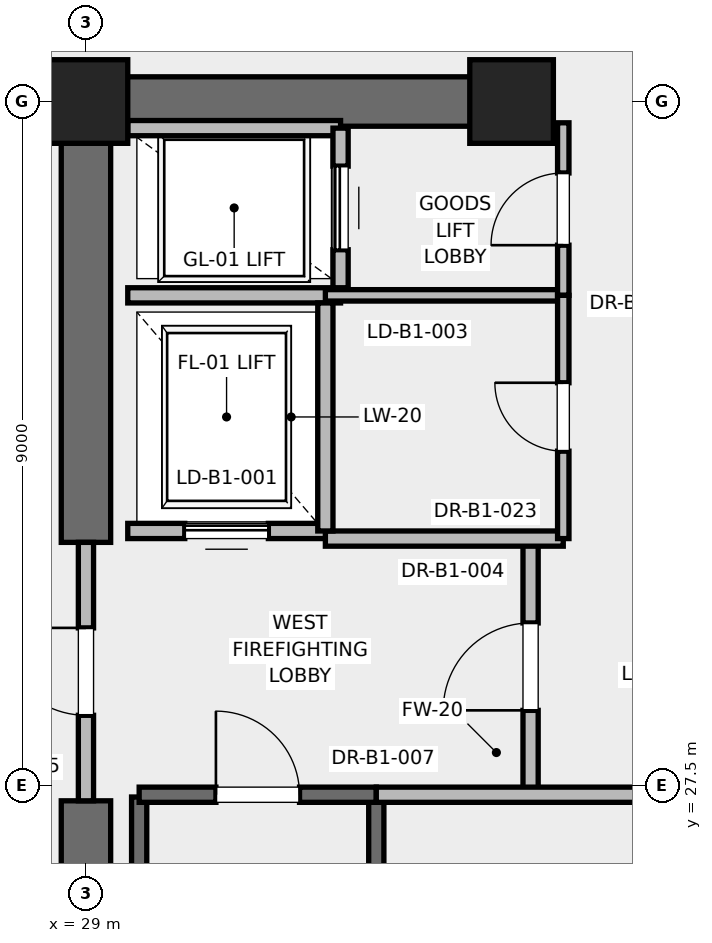
"""IFC4 building model, lengths in metres.
Left out: names, types, materials, properties, quantities, classifications, styles, units other than length and angle.
Written with IfcOpenShell. Run it as: python <this file> out.ifc"""

import sys

from ifc_helpers import new_model, si_unit, direction, frame, frame_2d, origin, origin_2d, place, context, subcontext, project, spatial, rectangle, extrude, element, fill, save


model = new_model("IFC4")
c1 = context("Model", 3, precision=1e-05, world=origin(), true_north=direction((0.0, 1.0)))
c2 = subcontext(c1, "Body", "Model", "MODEL_VIEW")
j1 = project(units=[si_unit("LENGTHUNIT", "METRE"), si_unit("PLANEANGLEUNIT", "RADIAN")], contexts=[c1])
p1 = place(None, origin())
s1 = spatial("IfcSite", under=j1, at=p1, CompositionType="ELEMENT")
p2 = place(p1, origin())
s2 = spatial("IfcBuilding", under=s1, at=p2, CompositionType="ELEMENT")
p3 = place(p2, frame((0.0, 0.0, -4.5)))
s3 = spatial("IfcBuildingStorey", under=s2, at=p3, CompositionType="ELEMENT", Elevation=-4.5)
for number, where, z_axis, x_axis in (
    (1, (29.0, 36.5, 0.0), (0.0, 0.0, 1.0), (1.0, 0.0, 0.0)),
    (2, (34.6, 36.5, 0.0), (0.0, 0.0, 1.0), (1.0, 0.0, 0.0)),
):
    element("IfcColumn", number, at=place(p3, frame(where, z_axis=z_axis, x_axis=x_axis)), inside=s3, PredefinedType="PILASTER", context=c2, shape_type="SweptSolid", body=[
        extrude(rectangle(XDim=1.1, YDim=1.1, at=origin_2d()), origin(), (0.0, 0.0, 1.0), 4.5),
    ])
p4 = place(p3, frame((29.0, 36.5, 0.0), z_axis=(0.0, 0.0, 1.0), x_axis=(1.0, 0.0, 0.0)))
e3 = element("IfcWall", 3, at=p4, inside=s3, PredefinedType="SHEAR", context=c2, shape_type="SweptSolid", body=[
    extrude(rectangle(XDim=5.8, YDim=0.65, at=frame_2d((2.9, 0.0))), origin(), (0.0, 0.0, 1.0), 4.22),
])
p5 = place(p3, frame((29.0, 18.5, 0.0), z_axis=(0.0, 0.0, 1.0), x_axis=(0.0, 1.0, 0.0)))
e4 = element("IfcWall", 4, at=p5, inside=s3, PredefinedType="SHEAR", context=c2, shape_type="SweptSolid", body=[
    extrude(rectangle(XDim=8.8, YDim=0.65, at=frame_2d((4.4, 0.0))), origin(), (0.0, 0.0, 1.0), 4.22),
])
p6 = place(p3, frame((29.0, 30.7, 0.0), z_axis=(0.0, 0.0, 1.0), x_axis=(0.0, 1.0, 0.0)))
e5 = element("IfcWall", 5, at=p6, inside=s3, PredefinedType="SHEAR", context=c2, shape_type="SweptSolid", body=[
    extrude(rectangle(XDim=5.8, YDim=0.65, at=frame_2d((2.9, 0.0))), origin(), (0.0, 0.0, 1.0), 4.22),
])
p7 = place(p3, frame((29.7, 19.2, 0.0), z_axis=(0.0, 0.0, 1.0), x_axis=(0.0, 1.0, 0.0)))
e6 = element("IfcWall", 6, at=p7, inside=s3, PredefinedType="SOLIDWALL", context=c2, shape_type="SweptSolid", body=[
    extrude(rectangle(XDim=8.15, YDim=0.2, at=frame_2d((4.075, 0.0))), origin(), (0.0, 0.0, 1.0), 4.22),
])
p8 = place(p3, frame((32.82, 18.6, 0.0), z_axis=(0.0, 0.0, 1.0), x_axis=(0.0, 1.0, 0.0)))
e7 = element("IfcWall", 7, at=p8, inside=s3, PredefinedType="SOLIDWALL", context=c2, shape_type="SweptSolid", body=[
    extrude(rectangle(XDim=8.78, YDim=0.2, at=frame_2d((4.39, 0.0))), origin(), (0.0, 0.0, 1.0), 4.22),
])
p9 = place(p3, frame((29.7, 27.38, 0.0), z_axis=(0.0, 0.0, 1.0), x_axis=(1.0, 0.0, 0.0)))
e8 = element("IfcWall", 8, at=p9, inside=s3, PredefinedType="SOLIDWALL", context=c2, shape_type="SweptSolid", body=[
    extrude(rectangle(XDim=3.12, YDim=0.2, at=frame_2d((1.56, 0.0))), origin(), (0.0, 0.0, 1.0), 4.22),
])
p10 = place(p9, frame((1.01, 0.0, 0.0)))
e9 = element("IfcOpeningElement", 9, at=p10, cuts=e8, PredefinedType="OPENING", context=c2, shape_type="SweptSolid", body=[
    extrude(rectangle(XDim=1.1, YDim=2.15, at=frame_2d((0.55, 1.075))), frame((0.0, 0.1, 0.0), z_axis=(0.0, -1.0, 0.0), x_axis=(1.0, 0.0, 0.0)), (0.0, 0.0, 1.0), 0.2),
])
p11 = place(p3, frame((34.85, 27.38, 0.0), z_axis=(0.0, 0.0, 1.0), x_axis=(0.0, 1.0, 0.0)))
e10 = element("IfcWall", 10, at=p11, inside=s3, PredefinedType="PARTITIONING", context=c2, shape_type="SweptSolid", body=[
    extrude(rectangle(XDim=3.37, YDim=0.2, at=frame_2d((1.685, 0.0))), origin(), (0.0, 0.0, 1.0), 4.22),
])
p12 = place(p11, frame((1.11, 0.0, 0.0)))
e11 = element("IfcOpeningElement", 11, at=p12, cuts=e10, PredefinedType="OPENING", context=c2, shape_type="SweptSolid", body=[
    extrude(rectangle(XDim=1.15, YDim=2.2, at=frame_2d((0.575, 1.1))), frame((0.0, 0.1, 0.0), z_axis=(0.0, -1.0, 0.0), x_axis=(1.0, 0.0, 0.0)), (0.0, 0.0, 1.0), 0.2),
])
p13 = place(p3, frame((29.0, 27.3, 0.0), z_axis=(0.0, 0.0, 1.0), x_axis=(0.0, 1.0, 0.0)))
e12 = element("IfcWall", 12, at=p13, inside=s3, PredefinedType="PARTITIONING", context=c2, shape_type="SweptSolid", body=[
    extrude(rectangle(XDim=3.4, YDim=0.2, at=frame_2d((1.7, 0.0))), origin(), (0.0, 0.0, 1.0), 3.0),
])
p14 = place(p13, frame((1.125, 0.0, 0.0)))
e13 = element("IfcOpeningElement", 13, at=p14, cuts=e12, PredefinedType="OPENING", context=c2, shape_type="SweptSolid", body=[
    extrude(rectangle(XDim=1.15, YDim=2.2, at=frame_2d((0.575, 1.1))), frame((0.0, 0.1, 0.0), z_axis=(0.0, -1.0, 0.0), x_axis=(1.0, 0.0, 0.0)), (0.0, 0.0, 1.0), 0.2),
])
p15 = place(p3, frame((32.82, 27.38, 0.0), z_axis=(0.0, 0.0, 1.0), x_axis=(1.0, 0.0, 0.0)))
e14 = element("IfcWall", 14, at=p15, inside=s3, PredefinedType="PARTITIONING", context=c2, shape_type="SweptSolid", body=[
    extrude(rectangle(XDim=5.62, YDim=0.2, at=frame_2d((2.81, 0.0))), origin(), (0.0, 0.0, 1.0), 4.22),
])
p16 = place(p3, frame((32.15, 30.75, 0.0), z_axis=(0.0, 0.0, 1.0), x_axis=(1.0, 0.0, 0.0)))
e15 = element("IfcWall", 15, at=p16, inside=s3, PredefinedType="PARTITIONING", context=c2, shape_type="SweptSolid", body=[
    extrude(rectangle(XDim=3.13, YDim=0.2, at=frame_2d((1.565, 0.0))), origin(), (0.0, 0.0, 1.0), 4.22),
])
p17 = place(p3, frame((29.55, 30.85, 0.0), z_axis=(0.0, 0.0, 1.0), x_axis=(1.0, 0.0, 0.0)))
e16 = element("IfcWall", 16, at=p17, inside=s3, PredefinedType="SOLIDWALL", context=c2, shape_type="SweptSolid", body=[
    extrude(rectangle(XDim=2.6, YDim=0.2, at=frame_2d((1.3, 0.0))), origin(), (0.0, 0.0, 1.0), 3.0),
])
p18 = place(p17, frame((0.75, 0.0, 0.0)))
e17 = element("IfcOpeningElement", 17, at=p18, cuts=e16, PredefinedType="OPENING", context=c2, shape_type="SweptSolid", body=[
    extrude(rectangle(XDim=1.1, YDim=2.2, at=frame_2d((0.55, 1.1))), frame((0.0, 0.1, 0.0), z_axis=(0.0, -1.0, 0.0), x_axis=(1.0, 0.0, 0.0)), (0.0, 0.0, 1.0), 0.2),
])
p19 = place(p3, frame((29.55, 33.95, 0.0), z_axis=(0.0, 0.0, 1.0), x_axis=(1.0, 0.0, 0.0)))
e18 = element("IfcWall", 18, at=p19, inside=s3, PredefinedType="SOLIDWALL", context=c2, shape_type="SweptSolid", body=[
    extrude(rectangle(XDim=2.8, YDim=0.2, at=frame_2d((1.4, 0.0))), origin(), (0.0, 0.0, 1.0), 4.22),
])
p20 = place(p3, frame((32.15, 30.85, 0.0), z_axis=(0.0, 0.0, 1.0), x_axis=(0.0, 1.0, 0.0)))
e19 = element("IfcWall", 19, at=p20, inside=s3, PredefinedType="SOLIDWALL", context=c2, shape_type="SweptSolid", body=[
    extrude(rectangle(XDim=3.0, YDim=0.2, at=frame_2d((1.5, 0.0))), origin(), (0.0, 0.0, 1.0), 4.22),
])
p21 = place(p3, frame((32.35, 36.15, 0.0), z_axis=(0.0, 0.0, 1.0), x_axis=(-1.0, 0.0, 0.0)))
e20 = element("IfcWall", 20, at=p21, inside=s3, PredefinedType="SOLIDWALL", context=c2, shape_type="SweptSolid", body=[
    extrude(rectangle(XDim=2.8, YDim=0.2, at=frame_2d((1.4, 0.0))), origin(), (0.0, 0.0, 1.0), 3.4),
])
p22 = place(p3, frame((32.35, 34.05, 0.0), z_axis=(0.0, 0.0, 1.0), x_axis=(0.0, 1.0, 0.0)))
e21 = element("IfcWall", 21, at=p22, inside=s3, PredefinedType="SOLIDWALL", context=c2, shape_type="SweptSolid", body=[
    extrude(rectangle(XDim=2.1, YDim=0.2, at=frame_2d((1.05, 0.0))), origin(), (0.0, 0.0, 1.0), 4.22),
])
p23 = place(p22, frame((0.5, 0.0, 0.0)))
e22 = element("IfcOpeningElement", 22, at=p23, cuts=e21, PredefinedType="OPENING", context=c2, shape_type="SweptSolid", body=[
    extrude(rectangle(XDim=1.1, YDim=2.2, at=frame_2d((0.55, 1.1))), frame((0.0, 0.1, 0.0), z_axis=(0.0, -1.0, 0.0), x_axis=(1.0, 0.0, 0.0)), (0.0, 0.0, 1.0), 0.2),
])
p24 = place(p3, frame((32.15, 33.95, 0.0), z_axis=(0.0, 0.0, 1.0), x_axis=(1.0, 0.0, 0.0)))
e23 = element("IfcWall", 23, at=p24, inside=s3, PredefinedType="PARTITIONING", context=c2, shape_type="SweptSolid", body=[
    extrude(rectangle(XDim=3.13, YDim=0.15, at=frame_2d((1.565, 0.0))), origin(), (0.0, 0.0, 1.0), 2.85),
])
p25 = place(p3, frame((35.28, 33.95, 0.0), z_axis=(0.0, 0.0, 1.0), x_axis=(0.0, 1.0, 0.0)))
e24 = element("IfcWall", 24, at=p25, inside=s3, PredefinedType="PARTITIONING", context=c2, shape_type="SweptSolid", body=[
    extrude(rectangle(XDim=2.27, YDim=0.15, at=frame_2d((1.135, 0.0))), origin(), (0.0, 0.0, 1.0), 2.85),
])
p26 = place(p25, frame((0.66, 0.0, 0.0)))
e25 = element("IfcOpeningElement", 25, at=p26, cuts=e24, PredefinedType="OPENING", context=c2, shape_type="SweptSolid", body=[
    extrude(rectangle(XDim=0.95, YDim=2.15, at=frame_2d((0.475, 1.075))), frame((0.0, 0.075, 0.0), z_axis=(0.0, -1.0, 0.0), x_axis=(1.0, 0.0, 0.0)), (0.0, 0.0, 1.0), 0.15),
])
p27 = place(p3, frame((35.28, 30.75, 0.0), z_axis=(0.0, 0.0, 1.0), x_axis=(0.0, 1.0, 0.0)))
e26 = element("IfcWall", 26, at=p27, inside=s3, PredefinedType="PARTITIONING", context=c2, shape_type="SweptSolid", body=[
    extrude(rectangle(XDim=3.2, YDim=0.15, at=frame_2d((1.6, 0.0))), origin(), (0.0, 0.0, 1.0), 2.85),
])
p28 = place(p27, frame((1.15, 0.0, 0.0)))
e27 = element("IfcOpeningElement", 27, at=p28, cuts=e26, PredefinedType="OPENING", context=c2, shape_type="SweptSolid", body=[
    extrude(rectangle(XDim=0.9, YDim=2.1, at=frame_2d((0.45, 1.05))), frame((0.0, 0.075, 0.0), z_axis=(0.0, -1.0, 0.0), x_axis=(1.0, 0.0, 0.0)), (0.0, 0.0, 1.0), 0.15),
])
p29 = place(p10, origin())
e28 = element("IfcDoor", 28, at=p29, inside=s3, OperationType="SINGLE_SWING_LEFT", PredefinedType="DOOR", context=c2, shape_type="SweptSolid", body=[
    extrude(rectangle(XDim=1.1, YDim=2.15, at=frame_2d((0.55, 1.075))), frame((0.0, 0.025, 0.0), z_axis=(0.0, -1.0, 0.0), x_axis=(1.0, 0.0, 0.0)), (0.0, 0.0, 1.0), 0.05),
])
fill(e9, e28)
p30 = place(p12, origin())
e29 = element("IfcDoor", 29, at=p30, inside=s3, OperationType="SINGLE_SWING_LEFT", PredefinedType="DOOR", context=c2, shape_type="SweptSolid", body=[
    extrude(rectangle(XDim=1.15, YDim=2.2, at=frame_2d((0.575, 1.1))), frame((0.0, 0.025, 0.0), z_axis=(0.0, -1.0, 0.0), x_axis=(1.0, 0.0, 0.0)), (0.0, 0.0, 1.0), 0.05),
])
fill(e11, e29)
p31 = place(p14, origin())
e30 = element("IfcDoor", 30, at=p31, inside=s3, OperationType="SINGLE_SWING_RIGHT", PredefinedType="DOOR", context=c2, shape_type="SweptSolid", body=[
    extrude(rectangle(XDim=1.15, YDim=2.2, at=frame_2d((0.575, 1.1))), frame((0.0, 0.025, 0.0), z_axis=(0.0, -1.0, 0.0), x_axis=(1.0, 0.0, 0.0)), (0.0, 0.0, 1.0), 0.05),
])
fill(e13, e30)
p32 = place(p18, origin())
e31 = element("IfcDoor", 31, at=p32, inside=s3, OperationType="SLIDING_TO_RIGHT", PredefinedType="DOOR", context=c2, shape_type="SweptSolid", body=[
    extrude(rectangle(XDim=1.1, YDim=2.2, at=frame_2d((0.55, 1.1))), frame((0.0, 0.025, 0.0), z_axis=(0.0, -1.0, 0.0), x_axis=(1.0, 0.0, 0.0)), (0.0, 0.0, 1.0), 0.05),
])
fill(e17, e31)
p33 = place(p23, origin())
e32 = element("IfcDoor", 32, at=p33, inside=s3, OperationType="SLIDING_TO_RIGHT", PredefinedType="DOOR", context=c2, shape_type="SweptSolid", body=[
    extrude(rectangle(XDim=1.1, YDim=2.2, at=frame_2d((0.55, 1.1))), frame((0.0, 0.025, 0.0), z_axis=(0.0, -1.0, 0.0), x_axis=(1.0, 0.0, 0.0)), (0.0, 0.0, 1.0), 0.05),
])
fill(e22, e32)
p34 = place(p26, origin())
e33 = element("IfcDoor", 33, at=p34, inside=s3, OperationType="SINGLE_SWING_LEFT", PredefinedType="DOOR", context=c2, shape_type="SweptSolid", body=[
    extrude(rectangle(XDim=0.95, YDim=2.15, at=frame_2d((0.475, 1.075))), frame((0.0, 0.025, 0.0), z_axis=(0.0, -1.0, 0.0), x_axis=(1.0, 0.0, 0.0)), (0.0, 0.0, 1.0), 0.05),
])
fill(e25, e33)
p35 = place(p28, origin())
e34 = element("IfcDoor", 34, at=p35, inside=s3, OperationType="SINGLE_SWING_RIGHT", PredefinedType="DOOR", context=c2, shape_type="SweptSolid", body=[
    extrude(rectangle(XDim=0.9, YDim=2.1, at=frame_2d((0.45, 1.05))), frame((0.0, 0.025, 0.0), z_axis=(0.0, -1.0, 0.0), x_axis=(1.0, 0.0, 0.0)), (0.0, 0.0, 1.0), 0.05),
])
fill(e27, e34)
save(model, sys.argv[1])
